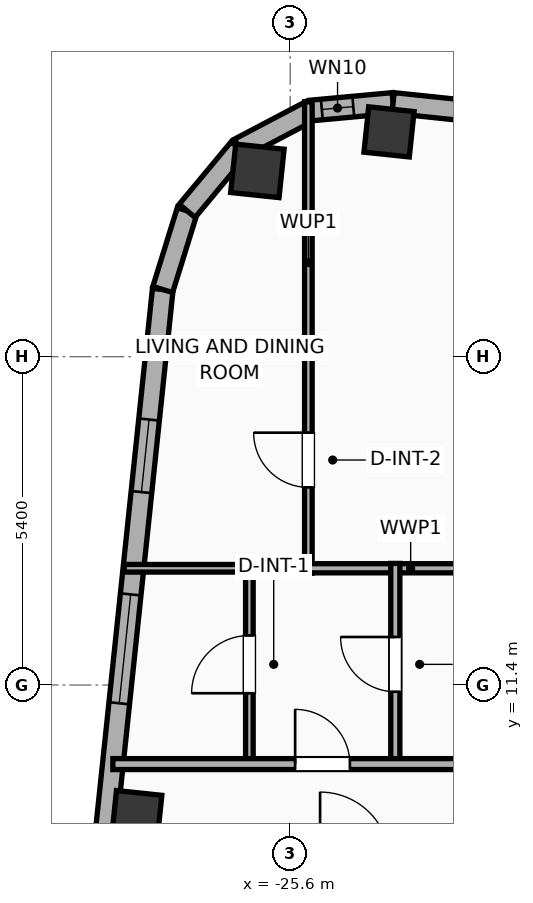
"""IFC4 building model, lengths in metres.
Left out: names, types, materials, properties, quantities, classifications, styles, units other than length and angle.
Written with IfcOpenShell. Run it as: python <this file> out.ifc"""

import sys

from ifc_helpers import new_model, si_unit, direction, frame, frame_2d, origin, origin_2d, place, context, subcontext, project, spatial, rectangle, hollow_rectangle, hollow_circle, extrude, element, fill, save


model = new_model("IFC4")
c1 = context("Model", 3, precision=1e-05, world=origin(), true_north=direction((0.0, 1.0)))
c2 = subcontext(c1, "Body", "Model", "MODEL_VIEW")
j1 = project(units=[si_unit("LENGTHUNIT", "METRE"), si_unit("PLANEANGLEUNIT", "RADIAN")], contexts=[c1])
p1 = place(None, origin())
s1 = spatial("IfcSite", under=j1, at=p1, CompositionType="ELEMENT")
p2 = place(p1, origin())
s2 = spatial("IfcBuilding", under=s1, at=p2, CompositionType="ELEMENT")
p3 = place(p2, frame((0.0, 0.0, 271.7)))
s3 = spatial("IfcBuildingStorey", under=s2, at=p3, CompositionType="ELEMENT", Elevation=271.7)
p4 = place(p3, frame((-23.975, 20.497, 0.0), z_axis=(0.0, 0.0, 1.0), x_axis=(0.994521895368, -0.104528463268, 0.0)))
e1 = element("IfcColumn", 1, at=p4, inside=s3, PredefinedType="COLUMN", context=c2, shape_type="SweptSolid", body=[
    extrude(hollow_rectangle(XDim=0.75, YDim=0.75, WallThickness=0.025, at=origin_2d()), origin(), (0.0, 0.0, 1.0), 3.9),
])
p5 = place(p3, frame((-26.139, 19.855, 0.0), z_axis=(0.0, 0.0, 1.0), x_axis=(0.994521895368, -0.104528463268, 0.0)))
e2 = element("IfcColumn", 2, at=p5, inside=s3, PredefinedType="COLUMN", context=c2, shape_type="SweptSolid", body=[
    extrude(hollow_circle(Radius=0.4, WallThickness=0.028, at=origin_2d()), origin(), (0.0, 0.0, 1.0), 3.9),
])
p6 = place(p3, frame((-28.123, 9.252, 0.0), z_axis=(0.0, 0.0, 1.0), x_axis=(0.994521895368, -0.104528463268, 0.0)))
e3 = element("IfcColumn", 3, at=p6, inside=s3, PredefinedType="COLUMN", context=c2, shape_type="SweptSolid", body=[
    extrude(hollow_rectangle(XDim=0.75, YDim=0.75, WallThickness=0.025, at=origin_2d()), origin(), (0.0, 0.0, 1.0), 3.9),
])
p7 = place(p3, frame((-30.87, -12.296, 0.0), z_axis=(0.0, 0.0, 1.0), x_axis=(0.104533282919, 0.994521388791, 0.0)))
e4 = element("IfcWall", 4, at=p7, inside=s3, PredefinedType="ELEMENTEDWALL", context=c2, shape_type="SweptSolid", body=[
    extrude(rectangle(XDim=30.366, YDim=0.34, at=frame_2d((15.183, 0.0))), origin(), (0.0, 0.0, 1.0), 3.65),
])
p8 = place(p7, frame((5.842, 0.0, 0.75)))
e5 = element("IfcOpeningElement", 5, at=p8, cuts=e4, PredefinedType="OPENING", context=c2, shape_type="SweptSolid", body=[
    extrude(rectangle(XDim=1.8, YDim=2.1, at=frame_2d((0.9, 1.05))), frame((0.0, 0.18, 0.0), z_axis=(0.0, -1.0, 0.0), x_axis=(1.0, 0.0, 0.0)), (0.0, 0.0, 1.0), 0.36),
])
p9 = place(p7, frame((23.525, 0.0, 0.75)))
e6 = element("IfcOpeningElement", 6, at=p9, cuts=e4, PredefinedType="OPENING", context=c2, shape_type="SweptSolid", body=[
    extrude(rectangle(XDim=1.8, YDim=2.1, at=frame_2d((0.9, 1.05))), frame((0.0, 0.18, 0.0), z_axis=(0.0, -1.0, 0.0), x_axis=(1.0, 0.0, 0.0)), (0.0, 0.0, 1.0), 0.36),
])
p10 = place(p7, frame((27.017, 0.0, 0.75)))
e7 = element("IfcOpeningElement", 7, at=p10, cuts=e4, PredefinedType="OPENING", context=c2, shape_type="SweptSolid", body=[
    extrude(rectangle(XDim=1.2, YDim=2.05, at=frame_2d((0.6, 1.025))), frame((0.0, 0.18, 0.0), z_axis=(0.0, -1.0, 0.0), x_axis=(1.0, 0.0, 0.0)), (0.0, 0.0, 1.0), 0.36),
])
p11 = place(p7, frame((16.135, 0.0, 0.75)))
e8 = element("IfcOpeningElement", 8, at=p11, cuts=e4, PredefinedType="OPENING", context=c2, shape_type="SweptSolid", body=[
    extrude(rectangle(XDim=1.2, YDim=2.05, at=frame_2d((0.6, 1.025))), frame((0.0, 0.18, 0.0), z_axis=(0.0, -1.0, 0.0), x_axis=(1.0, 0.0, 0.0)), (0.0, 0.0, 1.0), 0.36),
])
p12 = place(p3, frame((-27.696, 17.905, 0.0), z_axis=(0.0, 0.0, 1.0), x_axis=(0.296416228123, 0.955058856671, 0.0)))
e9 = element("IfcWall", 9, at=p12, inside=s3, PredefinedType="ELEMENTEDWALL", context=c2, shape_type="SweptSolid", body=[
    extrude(rectangle(XDim=1.354, YDim=0.34, at=frame_2d((0.677, 0.0))), origin(), (0.0, 0.0, 1.0), 3.65),
])
p13 = place(p3, frame((-27.294, 19.198, 0.0), z_axis=(0.0, 0.0, 1.0), x_axis=(0.639501603217, 0.768789762863, 0.0)))
e10 = element("IfcWall", 10, at=p13, inside=s3, PredefinedType="ELEMENTEDWALL", context=c2, shape_type="SweptSolid", body=[
    extrude(rectangle(XDim=1.337, YDim=0.34, at=frame_2d((0.668, 0.0))), origin(), (0.0, 0.0, 1.0), 3.65),
])
p14 = place(p3, frame((-26.439, 20.226, 0.0), z_axis=(0.0, 0.0, 1.0), x_axis=(0.884922182678, 0.465738908193, 0.0)))
e11 = element("IfcWall", 11, at=p14, inside=s3, PredefinedType="ELEMENTEDWALL", context=c2, shape_type="SweptSolid", body=[
    extrude(rectangle(XDim=1.337, YDim=0.34, at=frame_2d((0.668, 0.0))), origin(), (0.0, 0.0, 1.0), 3.65),
])
p15 = place(p3, frame((-25.256, 20.848, 0.0), z_axis=(0.0, 0.0, 1.0), x_axis=(0.995813013343, 0.091413579172, 0.0)))
e12 = element("IfcWall", 12, at=p15, inside=s3, PredefinedType="ELEMENTEDWALL", context=c2, shape_type="SweptSolid", body=[
    extrude(rectangle(XDim=1.354, YDim=0.34, at=frame_2d((0.677, 0.0))), origin(), (0.0, 0.0, 1.0), 3.65),
])
p16 = place(p15, frame((0.177, 0.0, 0.75)))
e13 = element("IfcOpeningElement", 13, at=p16, cuts=e12, PredefinedType="OPENING", context=c2, shape_type="SweptSolid", body=[
    extrude(rectangle(XDim=0.52, YDim=2.05, at=frame_2d((0.26, 1.025))), frame((0.0, 0.18, 0.0), z_axis=(0.0, -1.0, 0.0), x_axis=(1.0, 0.0, 0.0)), (0.0, 0.0, 1.0), 0.36),
])
p17 = place(p3, frame((-23.908, 20.972, 0.0), z_axis=(0.0, 0.0, 1.0), x_axis=(0.994521888554, -0.104528528102, 0.0)))
e14 = element("IfcWall", 14, at=p17, inside=s3, PredefinedType="ELEMENTEDWALL", context=c2, shape_type="SweptSolid", body=[
    extrude(rectangle(XDim=46.766, YDim=0.34, at=frame_2d((23.383, 0.0))), origin(), (0.0, 0.0, 1.0), 3.65),
])
p18 = place(p17, frame((5.744, 0.0, 0.75)))
e15 = element("IfcOpeningElement", 15, at=p18, cuts=e14, PredefinedType="OPENING", context=c2, shape_type="SweptSolid", body=[
    extrude(rectangle(XDim=2.4, YDim=2.1, at=frame_2d((1.2, 1.05))), frame((0.0, 0.18, 0.0), z_axis=(0.0, -1.0, 0.0), x_axis=(1.0, 0.0, 0.0)), (0.0, 0.0, 1.0), 0.36),
])
p19 = place(p17, frame((3.05, 0.0, 0.75)))
e16 = element("IfcOpeningElement", 16, at=p19, cuts=e14, PredefinedType="OPENING", context=c2, shape_type="SweptSolid", body=[
    extrude(rectangle(XDim=1.2, YDim=2.05, at=frame_2d((0.6, 1.025))), frame((0.0, 0.18, 0.0), z_axis=(0.0, -1.0, 0.0), x_axis=(1.0, 0.0, 0.0)), (0.0, 0.0, 1.0), 0.36),
])
p20 = place(p17, frame((9.957, 0.0, 0.75)))
e17 = element("IfcOpeningElement", 17, at=p20, cuts=e14, PredefinedType="OPENING", context=c2, shape_type="SweptSolid", body=[
    extrude(rectangle(XDim=1.2, YDim=2.05, at=frame_2d((0.6, 1.025))), frame((0.0, 0.18, 0.0), z_axis=(0.0, -1.0, 0.0), x_axis=(1.0, 0.0, 0.0)), (0.0, 0.0, 1.0), 0.36),
])
p21 = place(p17, frame((13.05, 0.0, 0.75)))
e18 = element("IfcOpeningElement", 18, at=p21, cuts=e14, PredefinedType="OPENING", context=c2, shape_type="SweptSolid", body=[
    extrude(rectangle(XDim=1.2, YDim=2.05, at=frame_2d((0.6, 1.025))), frame((0.0, 0.18, 0.0), z_axis=(0.0, -1.0, 0.0), x_axis=(1.0, 0.0, 0.0)), (0.0, 0.0, 1.0), 0.36),
])
p22 = place(p17, frame((16.383, 0.0, 0.75)))
e19 = element("IfcOpeningElement", 19, at=p22, cuts=e14, PredefinedType="OPENING", context=c2, shape_type="SweptSolid", body=[
    extrude(rectangle(XDim=1.2, YDim=2.05, at=frame_2d((0.6, 1.025))), frame((0.0, 0.18, 0.0), z_axis=(0.0, -1.0, 0.0), x_axis=(1.0, 0.0, 0.0)), (0.0, 0.0, 1.0), 0.36),
])
p23 = place(p17, frame((19.716, 0.0, 0.75)))
e20 = element("IfcOpeningElement", 20, at=p23, cuts=e14, PredefinedType="OPENING", context=c2, shape_type="SweptSolid", body=[
    extrude(rectangle(XDim=1.2, YDim=2.05, at=frame_2d((0.6, 1.025))), frame((0.0, 0.18, 0.0), z_axis=(0.0, -1.0, 0.0), x_axis=(1.0, 0.0, 0.0)), (0.0, 0.0, 1.0), 0.36),
])
p24 = place(p17, frame((23.195, 0.0, 0.75)))
e21 = element("IfcOpeningElement", 21, at=p24, cuts=e14, PredefinedType="OPENING", context=c2, shape_type="SweptSolid", body=[
    extrude(rectangle(XDim=1.2, YDim=2.05, at=frame_2d((0.6, 1.025))), frame((0.0, 0.18, 0.0), z_axis=(0.0, -1.0, 0.0), x_axis=(1.0, 0.0, 0.0)), (0.0, 0.0, 1.0), 0.36),
])
p25 = place(p17, frame((26.194, 0.0, 0.75)))
e22 = element("IfcOpeningElement", 22, at=p25, cuts=e14, PredefinedType="OPENING", context=c2, shape_type="SweptSolid", body=[
    extrude(rectangle(XDim=1.2, YDim=2.05, at=frame_2d((0.6, 1.025))), frame((0.0, 0.18, 0.0), z_axis=(0.0, -1.0, 0.0), x_axis=(1.0, 0.0, 0.0)), (0.0, 0.0, 1.0), 0.36),
])
p26 = place(p17, frame((30.152, 0.0, 0.75)))
e23 = element("IfcOpeningElement", 23, at=p26, cuts=e14, PredefinedType="OPENING", context=c2, shape_type="SweptSolid", body=[
    extrude(rectangle(XDim=1.2, YDim=2.05, at=frame_2d((0.6, 1.025))), frame((0.0, 0.18, 0.0), z_axis=(0.0, -1.0, 0.0), x_axis=(1.0, 0.0, 0.0)), (0.0, 0.0, 1.0), 0.36),
])
p27 = place(p17, frame((33.631, 0.0, 0.75)))
e24 = element("IfcOpeningElement", 24, at=p27, cuts=e14, PredefinedType="OPENING", context=c2, shape_type="SweptSolid", body=[
    extrude(rectangle(XDim=1.2, YDim=2.05, at=frame_2d((0.6, 1.025))), frame((0.0, 0.18, 0.0), z_axis=(0.0, -1.0, 0.0), x_axis=(1.0, 0.0, 0.0)), (0.0, 0.0, 1.0), 0.36),
])
p28 = place(p17, frame((38.07, 0.0, 0.75)))
e25 = element("IfcOpeningElement", 25, at=p28, cuts=e14, PredefinedType="OPENING", context=c2, shape_type="SweptSolid", body=[
    extrude(rectangle(XDim=1.2, YDim=2.05, at=frame_2d((0.6, 1.025))), frame((0.0, 0.18, 0.0), z_axis=(0.0, -1.0, 0.0), x_axis=(1.0, 0.0, 0.0)), (0.0, 0.0, 1.0), 0.36),
])
p29 = place(p17, frame((40.589, 0.0, 0.75)))
e26 = element("IfcOpeningElement", 26, at=p29, cuts=e14, PredefinedType="OPENING", context=c2, shape_type="SweptSolid", body=[
    extrude(rectangle(XDim=1.2, YDim=2.05, at=frame_2d((0.6, 1.025))), frame((0.0, 0.18, 0.0), z_axis=(0.0, -1.0, 0.0), x_axis=(1.0, 0.0, 0.0)), (0.0, 0.0, 1.0), 0.36),
])
p30 = place(p17, frame((43.789, 0.0, 0.75)))
e27 = element("IfcOpeningElement", 27, at=p30, cuts=e14, PredefinedType="OPENING", context=c2, shape_type="SweptSolid", body=[
    extrude(rectangle(XDim=1.2, YDim=2.05, at=frame_2d((0.6, 1.025))), frame((0.0, 0.18, 0.0), z_axis=(0.0, -1.0, 0.0), x_axis=(1.0, 0.0, 0.0)), (0.0, 0.0, 1.0), 0.36),
])
p31 = place(p3, frame((-25.301, 13.24, 0.0), z_axis=(0.0, 0.0, 1.0), x_axis=(0.0, 1.0, 0.0)))
e28 = element("IfcWall", 28, at=p31, inside=s3, PredefinedType="PARTITIONING", context=c2, shape_type="SweptSolid", body=[
    extrude(rectangle(XDim=7.751, YDim=0.125, at=frame_2d((3.875, 0.0))), origin(), (0.0, 0.0, 1.0), 3.65),
])
p32 = place(p31, frame((1.41, 0.0, 0.0)))
e29 = element("IfcOpeningElement", 29, at=p32, cuts=e28, PredefinedType="OPENING", context=c2, shape_type="SweptSolid", body=[
    extrude(rectangle(XDim=0.9, YDim=2.05, at=frame_2d((0.45, 1.025))), frame((0.0, 0.073, 0.0), z_axis=(0.0, -1.0, 0.0), x_axis=(1.0, 0.0, 0.0)), (0.0, 0.0, 1.0), 0.145),
])
p33 = place(p3, frame((-25.421, 13.32, 0.0), z_axis=(0.0, 0.0, 1.0), x_axis=(1.0, 0.0, 0.0)))
e30 = element("IfcWall", 30, at=p33, inside=s3, PredefinedType="PLUMBINGWALL", context=c2, shape_type="SweptSolid", body=[
    extrude(rectangle(XDim=3.605, YDim=0.15, at=frame_2d((1.802, 0.0))), origin(), (0.0, 0.0, 1.0), 3.65),
])
p34 = place(p3, frame((-26.271, 10.08, 0.0), z_axis=(0.0, 0.0, 1.0), x_axis=(0.0, 1.0, 0.0)))
e31 = element("IfcWall", 31, at=p34, inside=s3, PredefinedType="PARTITIONING", context=c2, shape_type="SweptSolid", body=[
    extrude(rectangle(XDim=3.32, YDim=0.125, at=frame_2d((1.66, 0.0))), origin(), (0.0, 0.0, 1.0), 3.65),
])
p35 = place(p34, frame((1.185, 0.0, 0.0)))
e32 = element("IfcOpeningElement", 32, at=p35, cuts=e31, PredefinedType="OPENING", context=c2, shape_type="SweptSolid", body=[
    extrude(rectangle(XDim=0.95, YDim=2.05, at=frame_2d((0.475, 1.025))), frame((0.0, 0.073, 0.0), z_axis=(0.0, -1.0, 0.0), x_axis=(1.0, 0.0, 0.0)), (0.0, 0.0, 1.0), 0.145),
])
p36 = place(p3, frame((-28.329, 13.32, 0.0), z_axis=(0.0, 0.0, 1.0), x_axis=(1.0, 0.0, 0.0)))
e33 = element("IfcWall", 33, at=p36, inside=s3, PredefinedType="PARTITIONING", context=c2, shape_type="SweptSolid", body=[
    extrude(rectangle(XDim=2.178, YDim=0.125, at=frame_2d((1.089, 0.0))), origin(), (0.0, 0.0, 1.0), 3.65),
])
p37 = place(p3, frame((-23.871, 10.08, 0.0), z_axis=(0.0, 0.0, 1.0), x_axis=(0.0, 1.0, 0.0)))
e34 = element("IfcWall", 34, at=p37, inside=s3, PredefinedType="PLUMBINGWALL", context=c2, shape_type="SweptSolid", body=[
    extrude(rectangle(XDim=3.32, YDim=0.15, at=frame_2d((1.66, 0.0))), origin(), (0.0, 0.0, 1.0), 3.65),
])
p38 = place(p37, frame((1.21, 0.0, 0.0)))
e35 = element("IfcOpeningElement", 35, at=p38, cuts=e34, PredefinedType="OPENING", context=c2, shape_type="SweptSolid", body=[
    extrude(rectangle(XDim=0.9, YDim=2.05, at=frame_2d((0.45, 1.025))), frame((0.0, 0.085, 0.0), z_axis=(0.0, -1.0, 0.0), x_axis=(1.0, 0.0, 0.0)), (0.0, 0.0, 1.0), 0.17),
])
p39 = place(p3, frame((-28.516, 10.1, 0.0), z_axis=(0.0, 0.0, 1.0), x_axis=(1.0, 0.0, 0.0)))
e36 = element("IfcWall", 36, at=p39, inside=s3, PredefinedType="PARTITIONING", context=c2, shape_type="SweptSolid", body=[
    extrude(rectangle(XDim=53.955, YDim=0.18, at=frame_2d((26.978, 0.0))), origin(), (0.0, 0.0, 1.0), 3.65),
])
p40 = place(p39, frame((2.998, 0.0, 0.0)))
e37 = element("IfcOpeningElement", 37, at=p40, cuts=e36, PredefinedType="OPENING", context=c2, shape_type="SweptSolid", body=[
    extrude(rectangle(XDim=0.9, YDim=2.05, at=frame_2d((0.45, 1.025))), frame((0.0, 0.1, 0.0), z_axis=(0.0, -1.0, 0.0), x_axis=(1.0, 0.0, 0.0)), (0.0, 0.0, 1.0), 0.2),
])
p41 = place(p39, frame((9.656, 0.0, 0.0)))
e38 = element("IfcOpeningElement", 38, at=p41, cuts=e36, PredefinedType="OPENING", context=c2, shape_type="SweptSolid", body=[
    extrude(rectangle(XDim=0.9, YDim=2.05, at=frame_2d((0.45, 1.025))), frame((0.0, 0.1, 0.0), z_axis=(0.0, -1.0, 0.0), x_axis=(1.0, 0.0, 0.0)), (0.0, 0.0, 1.0), 0.2),
])
p42 = place(p39, frame((16.287, 0.0, 0.0)))
e39 = element("IfcOpeningElement", 39, at=p42, cuts=e36, PredefinedType="OPENING", context=c2, shape_type="SweptSolid", body=[
    extrude(rectangle(XDim=0.9, YDim=2.05, at=frame_2d((0.45, 1.025))), frame((0.0, 0.1, 0.0), z_axis=(0.0, -1.0, 0.0), x_axis=(1.0, 0.0, 0.0)), (0.0, 0.0, 1.0), 0.2),
])
p43 = place(p39, frame((22.918, 0.0, 0.0)))
e40 = element("IfcOpeningElement", 40, at=p43, cuts=e36, PredefinedType="OPENING", context=c2, shape_type="SweptSolid", body=[
    extrude(rectangle(XDim=0.9, YDim=2.05, at=frame_2d((0.45, 1.025))), frame((0.0, 0.1, 0.0), z_axis=(0.0, -1.0, 0.0), x_axis=(1.0, 0.0, 0.0)), (0.0, 0.0, 1.0), 0.2),
])
p44 = place(p39, frame((29.689, 0.0, 0.0)))
e41 = element("IfcOpeningElement", 41, at=p44, cuts=e36, PredefinedType="OPENING", context=c2, shape_type="SweptSolid", body=[
    extrude(rectangle(XDim=0.9, YDim=2.05, at=frame_2d((0.45, 1.025))), frame((0.0, 0.1, 0.0), z_axis=(0.0, -1.0, 0.0), x_axis=(1.0, 0.0, 0.0)), (0.0, 0.0, 1.0), 0.2),
])
p45 = place(p39, frame((36.612, 0.0, 0.0)))
e42 = element("IfcOpeningElement", 42, at=p45, cuts=e36, PredefinedType="OPENING", context=c2, shape_type="SweptSolid", body=[
    extrude(rectangle(XDim=0.9, YDim=2.05, at=frame_2d((0.45, 1.025))), frame((0.0, 0.1, 0.0), z_axis=(0.0, -1.0, 0.0), x_axis=(1.0, 0.0, 0.0)), (0.0, 0.0, 1.0), 0.2),
])
p46 = place(p39, frame((43.529, 0.0, 0.0)))
e43 = element("IfcOpeningElement", 43, at=p46, cuts=e36, PredefinedType="OPENING", context=c2, shape_type="SweptSolid", body=[
    extrude(rectangle(XDim=0.9, YDim=2.05, at=frame_2d((0.45, 1.025))), frame((0.0, 0.1, 0.0), z_axis=(0.0, -1.0, 0.0), x_axis=(1.0, 0.0, 0.0)), (0.0, 0.0, 1.0), 0.2),
])
p47 = place(p39, frame((50.452, 0.0, 0.0)))
e44 = element("IfcOpeningElement", 44, at=p47, cuts=e36, PredefinedType="OPENING", context=c2, shape_type="SweptSolid", body=[
    extrude(rectangle(XDim=0.9, YDim=2.05, at=frame_2d((0.45, 1.025))), frame((0.0, 0.1, 0.0), z_axis=(0.0, -1.0, 0.0), x_axis=(1.0, 0.0, 0.0)), (0.0, 0.0, 1.0), 0.2),
])
p48 = place(p9, origin())
e45 = element("IfcWindow", 45, at=p48, inside=s3, PartitioningType="SINGLE_PANEL", PredefinedType="WINDOW", context=c2, shape_type="SweptSolid", body=[
    extrude(rectangle(XDim=1.8, YDim=2.1, at=frame_2d((0.9, 1.05))), frame((0.0, 0.03, 0.0), z_axis=(0.0, -1.0, 0.0), x_axis=(1.0, 0.0, 0.0)), (0.0, 0.0, 1.0), 0.06),
])
fill(e6, e45)
p49 = place(p10, origin())
e46 = element("IfcWindow", 46, at=p49, inside=s3, PartitioningType="SINGLE_PANEL", PredefinedType="WINDOW", context=c2, shape_type="SweptSolid", body=[
    extrude(rectangle(XDim=1.2, YDim=2.05, at=frame_2d((0.6, 1.025))), frame((0.0, 0.03, 0.0), z_axis=(0.0, -1.0, 0.0), x_axis=(1.0, 0.0, 0.0)), (0.0, 0.0, 1.0), 0.06),
])
fill(e7, e46)
p50 = place(p16, origin())
e47 = element("IfcWindow", 47, at=p50, inside=s3, PartitioningType="SINGLE_PANEL", PredefinedType="WINDOW", context=c2, shape_type="SweptSolid", body=[
    extrude(rectangle(XDim=0.52, YDim=2.05, at=frame_2d((0.26, 1.025))), frame((0.0, 0.03, 0.0), z_axis=(0.0, -1.0, 0.0), x_axis=(1.0, 0.0, 0.0)), (0.0, 0.0, 1.0), 0.06),
])
fill(e13, e47)
p51 = place(p32, origin())
e48 = element("IfcDoor", 48, at=p51, inside=s3, OperationType="SINGLE_SWING_RIGHT", PredefinedType="DOOR", context=c2, shape_type="SweptSolid", body=[
    extrude(rectangle(XDim=0.9, YDim=2.05, at=frame_2d((0.45, 1.025))), frame((0.0, 0.025, 0.0), z_axis=(0.0, -1.0, 0.0), x_axis=(1.0, 0.0, 0.0)), (0.0, 0.0, 1.0), 0.05),
])
fill(e29, e48)
p52 = place(p35, origin())
e49 = element("IfcDoor", 49, at=p52, inside=s3, OperationType="SINGLE_SWING_LEFT", PredefinedType="DOOR", context=c2, shape_type="SweptSolid", body=[
    extrude(rectangle(XDim=0.95, YDim=2.05, at=frame_2d((0.475, 1.025))), frame((0.0, 0.025, 0.0), z_axis=(0.0, -1.0, 0.0), x_axis=(1.0, 0.0, 0.0)), (0.0, 0.0, 1.0), 0.05),
])
fill(e32, e49)
p53 = place(p38, origin())
e50 = element("IfcDoor", 50, at=p53, inside=s3, OperationType="SINGLE_SWING_RIGHT", PredefinedType="DOOR", context=c2, shape_type="SweptSolid", body=[
    extrude(rectangle(XDim=0.9, YDim=2.05, at=frame_2d((0.45, 1.025))), frame((0.0, 0.025, 0.0), z_axis=(0.0, -1.0, 0.0), x_axis=(1.0, 0.0, 0.0)), (0.0, 0.0, 1.0), 0.05),
])
fill(e35, e50)
p54 = place(p40, origin())
e51 = element("IfcDoor", 51, at=p54, inside=s3, OperationType="SINGLE_SWING_LEFT", PredefinedType="DOOR", context=c2, shape_type="SweptSolid", body=[
    extrude(rectangle(XDim=0.9, YDim=2.05, at=frame_2d((0.45, 1.025))), frame((0.0, 0.025, 0.0), z_axis=(0.0, -1.0, 0.0), x_axis=(1.0, 0.0, 0.0)), (0.0, 0.0, 1.0), 0.05),
])
fill(e37, e51)
save(model, sys.argv[1])
